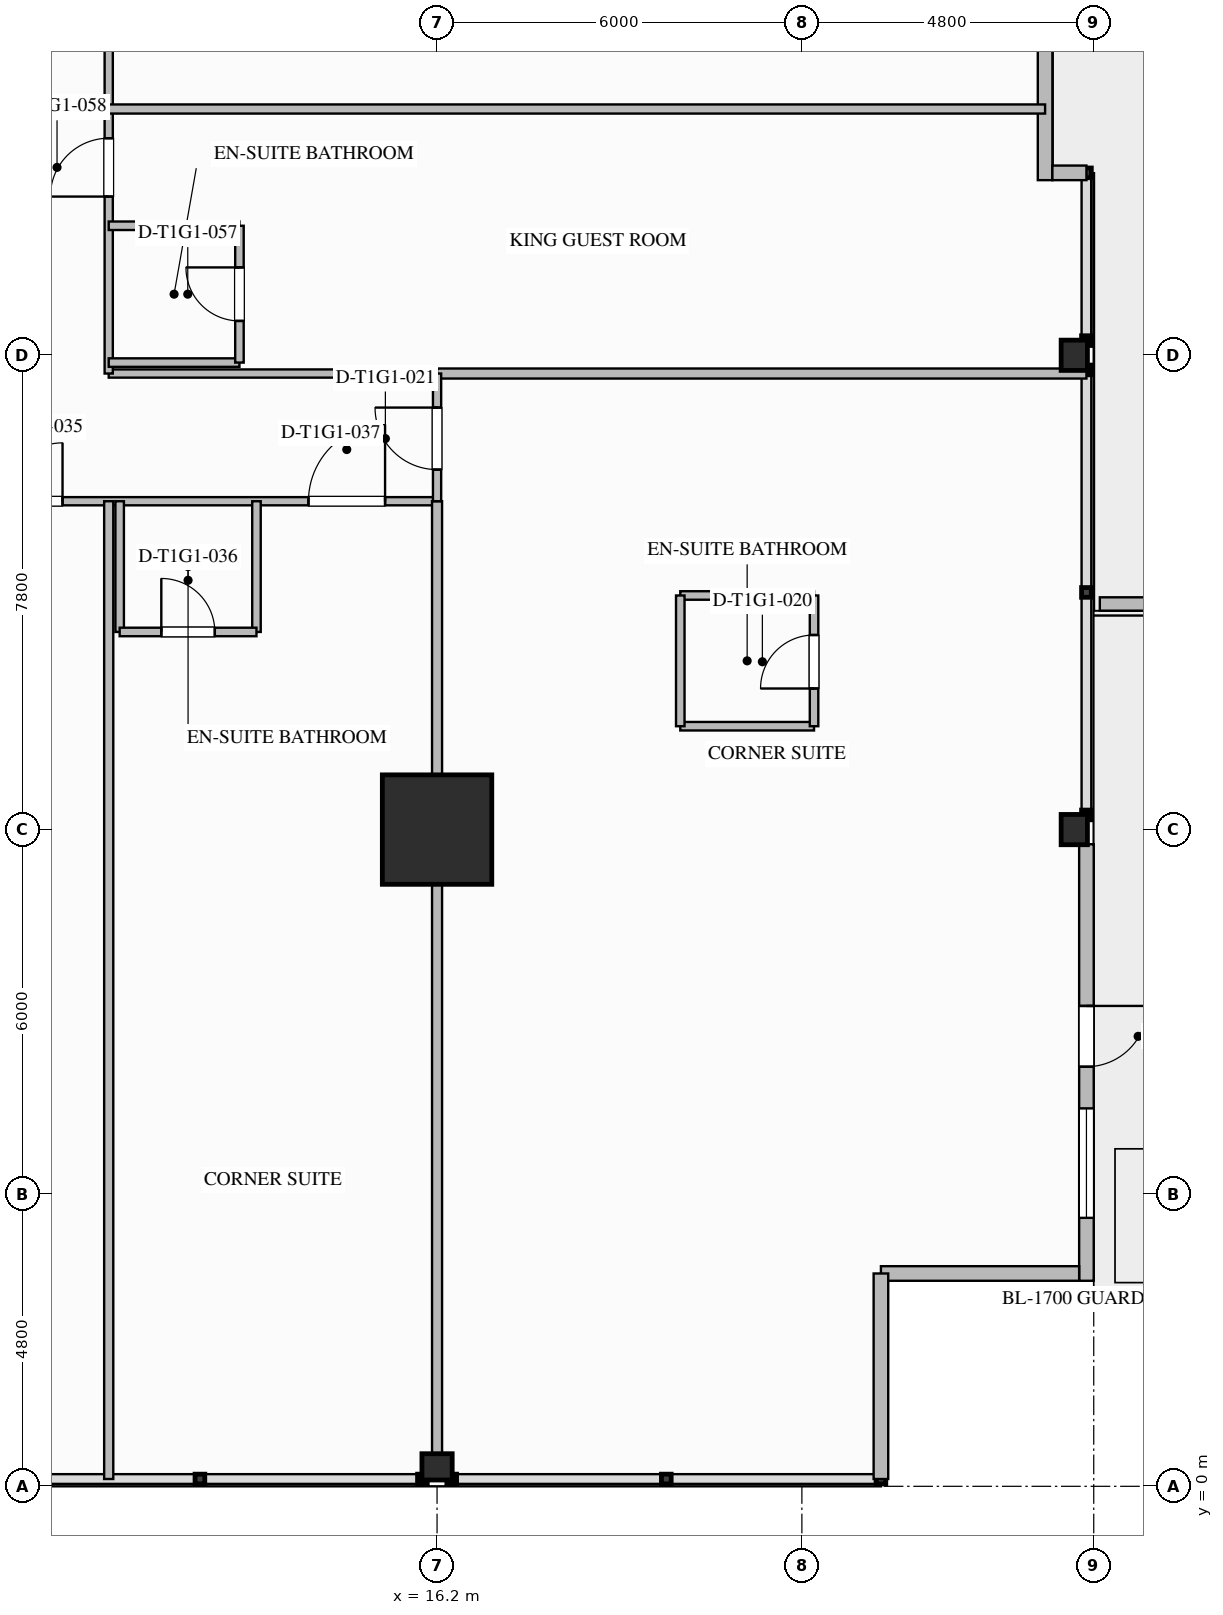
"""IFC4 building model, lengths in metres.
Left out: names, types, materials, properties, quantities, classifications, styles, units other than length and angle.
Written with IfcOpenShell. Run it as: python <this file> out.ifc"""

import sys

from ifc_helpers import new_model, si_unit, direction, frame, frame_2d, origin, origin_2d, place, context, subcontext, project, spatial, rectangle, i_section, extrude, element, fill, save


model = new_model("IFC4")
c1 = context("Model", 3, precision=1e-05, world=origin(), true_north=direction((0.0, 1.0)))
c2 = subcontext(c1, "Body", "Model", "MODEL_VIEW")
j1 = project(units=[si_unit("LENGTHUNIT", "METRE"), si_unit("PLANEANGLEUNIT", "RADIAN")], contexts=[c1])
p1 = place(None, origin())
s1 = spatial("IfcSite", under=j1, at=p1, CompositionType="ELEMENT")
p2 = place(p1, origin())
s2 = spatial("IfcBuilding", under=s1, at=p2, CompositionType="ELEMENT")
p3 = place(p2, frame((0.0, 0.0, 33.2)))
s3 = spatial("IfcBuildingStorey", under=s2, at=p3, CompositionType="ELEMENT", Elevation=33.2)
p4 = place(p3, frame((16.2, 10.8, 0.0), z_axis=(0.0, 0.0, 1.0), x_axis=(1.0, 0.0, 0.0)))
e1 = element("IfcColumn", 1, at=p4, inside=s3, PredefinedType="COLUMN", context=c2, shape_type="SweptSolid", body=[
    extrude(rectangle(XDim=1.8, YDim=1.8, at=origin_2d()), origin(), (0.0, 0.0, 1.0), 3.5),
])
for number, where, z_axis, x_axis in (
    (2, (26.68, 10.8, -0.26), (0.0, 0.0, 1.0), (1.0, 0.0, 0.0)),
    (3, (26.68, 18.6, -0.26), (0.0, 0.0, 1.0), (1.0, 0.0, 0.0)),
    (4, (16.2, 0.32, -0.26), (0.0, 0.0, 1.0), (0.0, 1.0, 0.0)),
):
    element("IfcColumn", number, at=place(p3, frame(where, z_axis=z_axis, x_axis=x_axis)), inside=s3, PredefinedType="COLUMN", context=c2, shape_type="SweptSolid", body=[
        extrude(i_section(OverallWidth=0.432, OverallDepth=0.498, WebThickness=0.056, FlangeThickness=0.089, FilletRadius=0.03, at=origin_2d()), origin(), (0.0, 0.0, 1.0), 3.757),
    ])
p5 = place(p3, frame((38.89, 14.51, 0.0), z_axis=(0.0, 0.0, 1.0), x_axis=(-1.0, 0.0, 0.0)))
e5 = element("IfcWall", 5, at=p5, inside=s3, PredefinedType="PARAPET", context=c2, shape_type="SweptSolid", body=[
    extrude(rectangle(XDim=11.79, YDim=0.22, at=frame_2d((5.895, 0.0))), origin(), (0.0, 0.0, 1.0), 1.2),
])
p6 = place(p3, frame((26.2, 26.759, 0.0), z_axis=(0.0, 0.0, 1.0), x_axis=(0.0, -1.0, 0.0)))
e6 = element("IfcWall", 6, at=p6, inside=s3, PredefinedType="STANDARD", context=c2, shape_type="SweptSolid", body=[
    extrude(rectangle(XDim=5.279, YDim=0.24, at=frame_2d((2.64, 0.0))), origin(), (0.0, 0.0, 1.0), 2.629),
])
p7 = place(p6, frame((1.859, 0.0, 0.0)))
e7 = element("IfcOpeningElement", 7, at=p7, cuts=e6, PredefinedType="OPENING", context=c2, shape_type="SweptSolid", body=[
    extrude(rectangle(XDim=1.0, YDim=2.2, at=frame_2d((0.5, 1.1))), frame((0.0, 0.13, 0.0), z_axis=(0.0, -1.0, 0.0), x_axis=(1.0, 0.0, 0.0)), (0.0, 0.0, 1.0), 0.26),
])
p8 = place(p3, frame((26.88, 10.559, 0.0), z_axis=(0.0, 0.0, 1.0), x_axis=(0.0, -1.0, 0.0)))
e8 = element("IfcWall", 8, at=p8, inside=s3, PredefinedType="STANDARD", context=c2, shape_type="SweptSolid", body=[
    extrude(rectangle(XDim=7.179, YDim=0.24, at=frame_2d((3.59, 0.0))), origin(), (0.0, 0.0, 1.0), 3.24),
])
p9 = place(p8, frame((2.659, 0.0, 0.0)))
e9 = element("IfcOpeningElement", 9, at=p9, cuts=e8, PredefinedType="OPENING", context=c2, shape_type="SweptSolid", body=[
    extrude(rectangle(XDim=1.0, YDim=2.2, at=frame_2d((0.5, 1.1))), frame((0.0, 0.13, 0.0), z_axis=(0.0, -1.0, 0.0), x_axis=(1.0, 0.0, 0.0)), (0.0, 0.0, 1.0), 0.26),
])
p10 = place(p8, frame((4.344, 0.0, 0.75)))
e10 = element("IfcOpeningElement", 10, at=p10, cuts=e8, PredefinedType="OPENING", context=c2, shape_type="SweptSolid", body=[
    extrude(rectangle(XDim=1.8, YDim=2.05, at=frame_2d((0.9, 1.025))), frame((0.0, 0.13, 0.0), z_axis=(0.0, -1.0, 0.0), x_axis=(1.0, 0.0, 0.0)), (0.0, 0.0, 1.0), 0.26),
])
p11 = place(p3, frame((26.76, 3.5, 0.0), z_axis=(0.0, 0.0, 1.0), x_axis=(-1.0, 0.0, 0.0)))
e11 = element("IfcWall", 11, at=p11, inside=s3, PredefinedType="STANDARD", context=c2, shape_type="SweptSolid", body=[
    extrude(rectangle(XDim=3.26, YDim=0.24, at=frame_2d((1.63, 0.0))), origin(), (0.0, 0.0, 1.0), 3.24),
])
p12 = place(p3, frame((23.5, 3.5, 0.0), z_axis=(0.0, 0.0, 1.0), x_axis=(0.0, -1.0, 0.0)))
e12 = element("IfcWall", 12, at=p12, inside=s3, PredefinedType="STANDARD", context=c2, shape_type="SweptSolid", body=[
    extrude(rectangle(XDim=3.38, YDim=0.24, at=frame_2d((1.69, 0.0))), origin(), (0.0, 0.0, 1.0), 3.24),
])
p13 = place(p3, frame((26.32, 21.6, 0.0), z_axis=(0.0, 0.0, 1.0), x_axis=(1.0, 0.0, 0.0)))
e13 = element("IfcWall", 13, at=p13, inside=s3, PredefinedType="STANDARD", context=c2, shape_type="SweptSolid", body=[
    extrude(rectangle(XDim=0.56, YDim=0.24, at=frame_2d((0.28, 0.0))), origin(), (0.0, 0.0, 1.0), 3.24),
])
p14 = place(p3, frame((-16.2, 16.2, 0.0), z_axis=(0.0, 0.0, 1.0), x_axis=(1.0, 0.0, 0.0)))
e14 = element("IfcWall", 14, at=p14, inside=s3, PredefinedType="PARTITIONING", context=c2, shape_type="SweptSolid", body=[
    extrude(rectangle(XDim=32.4, YDim=0.135, at=frame_2d((16.2, 0.0))), origin(), (0.0, 0.0, 1.0), 3.24),
])
p15 = place(p14, frame((3.285, 0.0, 0.0)))
e15 = element("IfcOpeningElement", 15, at=p15, cuts=e14, PredefinedType="OPENING", context=c2, shape_type="SweptSolid", body=[
    extrude(rectangle(XDim=1.26, YDim=2.2, at=frame_2d((0.63, 1.1))), frame((0.0, 0.077, 0.0), z_axis=(0.0, -1.0, 0.0), x_axis=(1.0, 0.0, 0.0)), (0.0, 0.0, 1.0), 0.155),
])
p16 = place(p14, frame((8.59, 0.0, 0.0)))
e16 = element("IfcOpeningElement", 16, at=p16, cuts=e14, PredefinedType="OPENING", context=c2, shape_type="SweptSolid", body=[
    extrude(rectangle(XDim=0.96, YDim=2.15, at=frame_2d((0.48, 1.075))), frame((0.0, 0.077, 0.0), z_axis=(0.0, -1.0, 0.0), x_axis=(1.0, 0.0, 0.0)), (0.0, 0.0, 1.0), 0.155),
])
p17 = place(p14, frame((13.84, 0.0, 0.0)))
e17 = element("IfcOpeningElement", 17, at=p17, cuts=e14, PredefinedType="OPENING", context=c2, shape_type="SweptSolid", body=[
    extrude(rectangle(XDim=1.26, YDim=2.2, at=frame_2d((0.63, 1.1))), frame((0.0, 0.077, 0.0), z_axis=(0.0, -1.0, 0.0), x_axis=(1.0, 0.0, 0.0)), (0.0, 0.0, 1.0), 0.155),
])
p18 = place(p14, frame((19.73, 0.0, 0.0)))
e18 = element("IfcOpeningElement", 18, at=p18, cuts=e14, PredefinedType="OPENING", context=c2, shape_type="SweptSolid", body=[
    extrude(rectangle(XDim=1.26, YDim=2.2, at=frame_2d((0.63, 1.1))), frame((0.0, 0.077, 0.0), z_axis=(0.0, -1.0, 0.0), x_axis=(1.0, 0.0, 0.0)), (0.0, 0.0, 1.0), 0.155),
])
p19 = place(p14, frame((25.281, 0.0, 0.0)))
e19 = element("IfcOpeningElement", 19, at=p19, cuts=e14, PredefinedType="OPENING", context=c2, shape_type="SweptSolid", body=[
    extrude(rectangle(XDim=0.96, YDim=2.15, at=frame_2d((0.48, 1.075))), frame((0.0, 0.077, 0.0), z_axis=(0.0, -1.0, 0.0), x_axis=(1.0, 0.0, 0.0)), (0.0, 0.0, 1.0), 0.155),
])
p20 = place(p14, frame((30.285, 0.0, 0.0)))
e20 = element("IfcOpeningElement", 20, at=p20, cuts=e14, PredefinedType="OPENING", context=c2, shape_type="SweptSolid", body=[
    extrude(rectangle(XDim=1.26, YDim=2.2, at=frame_2d((0.63, 1.1))), frame((0.0, 0.077, 0.0), z_axis=(0.0, -1.0, 0.0), x_axis=(1.0, 0.0, 0.0)), (0.0, 0.0, 1.0), 0.155),
])
p21 = place(p3, frame((10.8, 18.3, 0.0), z_axis=(0.0, 0.0, 1.0), x_axis=(1.0, 0.0, 0.0)))
e21 = element("IfcWall", 21, at=p21, inside=s3, PredefinedType="PARTITIONING", context=c2, shape_type="SweptSolid", body=[
    extrude(rectangle(XDim=5.4, YDim=0.135, at=frame_2d((2.7, 0.0))), origin(), (0.0, 0.0, 1.0), 3.24),
])
p22 = place(p3, frame((10.8, 18.3, 0.0), z_axis=(0.0, 0.0, 1.0), x_axis=(0.0, 1.0, 0.0)))
e22 = element("IfcWall", 22, at=p22, inside=s3, PredefinedType="PARTITIONING", context=c2, shape_type="SweptSolid", body=[
    extrude(rectangle(XDim=17.4, YDim=0.135, at=frame_2d((8.7, 0.0))), origin(), (0.0, 0.0, 1.0), 3.24),
])
p23 = place(p22, frame((2.91, 0.0, 0.0)))
e23 = element("IfcOpeningElement", 23, at=p23, cuts=e22, PredefinedType="OPENING", context=c2, shape_type="SweptSolid", body=[
    extrude(rectangle(XDim=0.96, YDim=2.15, at=frame_2d((0.48, 1.075))), frame((0.0, 0.077, 0.0), z_axis=(0.0, -1.0, 0.0), x_axis=(1.0, 0.0, 0.0)), (0.0, 0.0, 1.0), 0.155),
])
p24 = place(p22, frame((6.015, 0.0, 0.0)))
e24 = element("IfcOpeningElement", 24, at=p24, cuts=e22, PredefinedType="OPENING", context=c2, shape_type="SweptSolid", body=[
    extrude(rectangle(XDim=1.02, YDim=2.15, at=frame_2d((0.51, 1.075))), frame((0.0, 0.077, 0.0), z_axis=(0.0, -1.0, 0.0), x_axis=(1.0, 0.0, 0.0)), (0.0, 0.0, 1.0), 0.155),
])
p25 = place(p22, frame((11.61, 0.0, 0.0)))
e25 = element("IfcOpeningElement", 25, at=p25, cuts=e22, PredefinedType="OPENING", context=c2, shape_type="SweptSolid", body=[
    extrude(rectangle(XDim=0.96, YDim=2.15, at=frame_2d((0.48, 1.075))), frame((0.0, 0.077, 0.0), z_axis=(0.0, -1.0, 0.0), x_axis=(1.0, 0.0, 0.0)), (0.0, 0.0, 1.0), 0.155),
])
p26 = place(p22, frame((15.96, 0.0, 0.0)))
e26 = element("IfcOpeningElement", 26, at=p26, cuts=e22, PredefinedType="OPENING", context=c2, shape_type="SweptSolid", body=[
    extrude(rectangle(XDim=0.96, YDim=2.15, at=frame_2d((0.48, 1.075))), frame((0.0, 0.077, 0.0), z_axis=(0.0, -1.0, 0.0), x_axis=(1.0, 0.0, 0.0)), (0.0, 0.0, 1.0), 0.155),
])
p27 = place(p3, frame((16.2, 0.12, 0.0), z_axis=(0.0, 0.0, 1.0), x_axis=(0.0, 1.0, 0.0)))
e27 = element("IfcWall", 27, at=p27, inside=s3, PredefinedType="PARTITIONING", context=c2, shape_type="SweptSolid", body=[
    extrude(rectangle(XDim=16.08, YDim=0.165, at=frame_2d((8.04, 0.0))), origin(), (0.0, 0.0, 1.0), 2.298),
])
p28 = place(p3, frame((16.2, 18.3, 0.0), z_axis=(0.0, 0.0, 1.0), x_axis=(1.0, 0.0, 0.0)))
e28 = element("IfcWall", 28, at=p28, inside=s3, PredefinedType="PARTITIONING", context=c2, shape_type="SweptSolid", body=[
    extrude(rectangle(XDim=10.68, YDim=0.165, at=frame_2d((5.34, 0.0))), origin(), (0.0, 0.0, 1.0), 2.298),
])
p29 = place(p3, frame((16.2, 16.2, 0.0), z_axis=(0.0, 0.0, 1.0), x_axis=(0.0, 1.0, 0.0)))
e29 = element("IfcWall", 29, at=p29, inside=s3, PredefinedType="PARTITIONING", context=c2, shape_type="SweptSolid", body=[
    extrude(rectangle(XDim=2.1, YDim=0.135, at=frame_2d((1.05, 0.0))), origin(), (0.0, 0.0, 1.0), 2.298),
])
p30 = place(p29, frame((0.52, 0.0, 0.0)))
e30 = element("IfcOpeningElement", 30, at=p30, cuts=e29, PredefinedType="OPENING", context=c2, shape_type="SweptSolid", body=[
    extrude(rectangle(XDim=1.02, YDim=2.15, at=frame_2d((0.51, 1.075))), frame((0.0, 0.077, 0.0), z_axis=(0.0, -1.0, 0.0), x_axis=(1.0, 0.0, 0.0)), (0.0, 0.0, 1.0), 0.155),
])
for number, where, z_axis, x_axis in (
    (31, (20.2, 12.5, 0.0), (0.0, 0.0, 1.0), (1.0, 0.0, 0.0)),
    (32, (20.2, 14.65, 0.0), (0.0, 0.0, 1.0), (1.0, 0.0, 0.0)),
):
    element("IfcWall", number, at=place(p3, frame(where, z_axis=z_axis, x_axis=x_axis)), inside=s3, PredefinedType="PLUMBINGWALL", context=c2, shape_type="SweptSolid", body=[
        extrude(rectangle(XDim=2.2, YDim=0.14, at=frame_2d((1.1, 0.0))), origin(), (0.0, 0.0, 1.0), 3.24),
    ])
p31 = place(p3, frame((20.2, 12.5, 0.0), z_axis=(0.0, 0.0, 1.0), x_axis=(0.0, 1.0, 0.0)))
e33 = element("IfcWall", 33, at=p31, inside=s3, PredefinedType="PLUMBINGWALL", context=c2, shape_type="SweptSolid", body=[
    extrude(rectangle(XDim=2.15, YDim=0.14, at=frame_2d((1.075, 0.0))), origin(), (0.0, 0.0, 1.0), 3.24),
])
p32 = place(p3, frame((22.4, 12.5, 0.0), z_axis=(0.0, 0.0, 1.0), x_axis=(0.0, 1.0, 0.0)))
e34 = element("IfcWall", 34, at=p32, inside=s3, PredefinedType="PLUMBINGWALL", context=c2, shape_type="SweptSolid", body=[
    extrude(rectangle(XDim=2.15, YDim=0.14, at=frame_2d((1.075, 0.0))), origin(), (0.0, 0.0, 1.0), 3.24),
])
p33 = place(p32, frame((0.62, 0.0, 0.0)))
e35 = element("IfcOpeningElement", 35, at=p33, cuts=e34, PredefinedType="OPENING", context=c2, shape_type="SweptSolid", body=[
    extrude(rectangle(XDim=0.88, YDim=2.1, at=frame_2d((0.44, 1.05))), frame((0.0, 0.08, 0.0), z_axis=(0.0, -1.0, 0.0), x_axis=(1.0, 0.0, 0.0)), (0.0, 0.0, 1.0), 0.16),
])
p34 = place(p3, frame((10.8, 0.12, 0.0), z_axis=(0.0, 0.0, 1.0), x_axis=(0.0, 1.0, 0.0)))
e36 = element("IfcWall", 36, at=p34, inside=s3, PredefinedType="PARTITIONING", context=c2, shape_type="SweptSolid", body=[
    extrude(rectangle(XDim=16.08, YDim=0.15, at=frame_2d((8.04, 0.0))), origin(), (0.0, 0.0, 1.0), 3.24),
])
for number, where, z_axis, x_axis in (
    (37, (10.98, 16.2, 0.0), (0.0, 0.0, 1.0), (0.0, -1.0, 0.0)),
    (38, (13.23, 16.2, 0.0), (0.0, 0.0, 1.0), (0.0, -1.0, 0.0)),
):
    element("IfcWall", number, at=place(p3, frame(where, z_axis=z_axis, x_axis=x_axis)), inside=s3, PredefinedType="PLUMBINGWALL", context=c2, shape_type="SweptSolid", body=[
        extrude(rectangle(XDim=2.15, YDim=0.14, at=frame_2d((1.075, 0.0))), origin(), (0.0, 0.0, 1.0), 3.24),
    ])
p35 = place(p3, frame((10.98, 14.05, 0.0), z_axis=(0.0, 0.0, 1.0), x_axis=(1.0, 0.0, 0.0)))
e39 = element("IfcWall", 39, at=p35, inside=s3, PredefinedType="PLUMBINGWALL", context=c2, shape_type="SweptSolid", body=[
    extrude(rectangle(XDim=2.25, YDim=0.14, at=frame_2d((1.125, 0.0))), origin(), (0.0, 0.0, 1.0), 3.24),
])
p36 = place(p35, frame((0.685, 0.0, 0.0)))
e40 = element("IfcOpeningElement", 40, at=p36, cuts=e39, PredefinedType="OPENING", context=c2, shape_type="SweptSolid", body=[
    extrude(rectangle(XDim=0.88, YDim=2.1, at=frame_2d((0.44, 1.05))), frame((0.0, 0.08, 0.0), z_axis=(0.0, -1.0, 0.0), x_axis=(1.0, 0.0, 0.0)), (0.0, 0.0, 1.0), 0.16),
])
p37 = place(p3, frame((10.8, 18.48, 0.0), z_axis=(0.0, 0.0, 1.0), x_axis=(1.0, 0.0, 0.0)))
e41 = element("IfcWall", 41, at=p37, inside=s3, PredefinedType="PLUMBINGWALL", context=c2, shape_type="SweptSolid", body=[
    extrude(rectangle(XDim=2.15, YDim=0.14, at=frame_2d((1.075, 0.0))), origin(), (0.0, 0.0, 1.0), 2.617),
])
p38 = place(p3, frame((10.8, 20.73, 0.0), z_axis=(0.0, 0.0, 1.0), x_axis=(1.0, 0.0, 0.0)))
e42 = element("IfcWall", 42, at=p38, inside=s3, PredefinedType="PLUMBINGWALL", context=c2, shape_type="SweptSolid", body=[
    extrude(rectangle(XDim=2.15, YDim=0.14, at=frame_2d((1.075, 0.0))), origin(), (0.0, 0.0, 1.0), 3.24),
])
p39 = place(p3, frame((12.95, 18.48, 0.0), z_axis=(0.0, 0.0, 1.0), x_axis=(0.0, 1.0, 0.0)))
e43 = element("IfcWall", 43, at=p39, inside=s3, PredefinedType="PLUMBINGWALL", context=c2, shape_type="SweptSolid", body=[
    extrude(rectangle(XDim=2.25, YDim=0.14, at=frame_2d((1.125, 0.0))), origin(), (0.0, 0.0, 1.0), 3.24),
])
p40 = place(p39, frame((0.685, 0.0, 0.0)))
e44 = element("IfcOpeningElement", 44, at=p40, cuts=e43, PredefinedType="OPENING", context=c2, shape_type="SweptSolid", body=[
    extrude(rectangle(XDim=0.88, YDim=2.1, at=frame_2d((0.44, 1.05))), frame((0.0, 0.08, 0.0), z_axis=(0.0, -1.0, 0.0), x_axis=(1.0, 0.0, 0.0)), (0.0, 0.0, 1.0), 0.16),
])
p41 = place(p3, frame((10.8, 22.65, 0.0), z_axis=(0.0, 0.0, 1.0), x_axis=(1.0, 0.0, 0.0)))
e45 = element("IfcWall", 45, at=p41, inside=s3, PredefinedType="PARTITIONING", context=c2, shape_type="SweptSolid", body=[
    extrude(rectangle(XDim=15.4, YDim=0.15, at=frame_2d((7.7, 0.0))), origin(), (0.0, 0.0, 1.0), 3.24),
])
p42 = place(p9, origin())
e46 = element("IfcDoor", 46, at=p42, inside=s3, OperationType="SINGLE_SWING_LEFT", PredefinedType="DOOR", context=c2, shape_type="SweptSolid", body=[
    extrude(rectangle(XDim=1.0, YDim=2.2, at=frame_2d((0.5, 1.1))), frame((0.0, 0.025, 0.0), z_axis=(0.0, -1.0, 0.0), x_axis=(1.0, 0.0, 0.0)), (0.0, 0.0, 1.0), 0.05),
])
fill(e9, e46)
p43 = place(p10, origin())
e47 = element("IfcWindow", 47, at=p43, inside=s3, PartitioningType="SINGLE_PANEL", PredefinedType="WINDOW", context=c2, shape_type="SweptSolid", body=[
    extrude(rectangle(XDim=1.8, YDim=2.05, at=frame_2d((0.9, 1.025))), frame((0.0, 0.03, 0.0), z_axis=(0.0, -1.0, 0.0), x_axis=(1.0, 0.0, 0.0)), (0.0, 0.0, 1.0), 0.06),
])
fill(e10, e47)
p44 = place(p33, origin())
e48 = element("IfcDoor", 48, at=p44, inside=s3, OperationType="SINGLE_SWING_LEFT", PredefinedType="DOOR", context=c2, shape_type="SweptSolid", body=[
    extrude(rectangle(XDim=0.88, YDim=2.1, at=frame_2d((0.44, 1.05))), frame((0.0, 0.025, 0.0), z_axis=(0.0, -1.0, 0.0), x_axis=(1.0, 0.0, 0.0)), (0.0, 0.0, 1.0), 0.05),
])
fill(e35, e48)
p45 = place(p30, origin())
e49 = element("IfcDoor", 49, at=p45, inside=s3, OperationType="SINGLE_SWING_RIGHT", PredefinedType="DOOR", context=c2, shape_type="SweptSolid", body=[
    extrude(rectangle(XDim=1.02, YDim=2.15, at=frame_2d((0.51, 1.075))), frame((0.0, 0.025, 0.0), z_axis=(0.0, -1.0, 0.0), x_axis=(1.0, 0.0, 0.0)), (0.0, 0.0, 1.0), 0.05),
])
fill(e30, e49)
p46 = place(p19, origin())
e50 = element("IfcDoor", 50, at=p46, inside=s3, OperationType="SINGLE_SWING_RIGHT", PredefinedType="DOOR", context=c2, shape_type="SweptSolid", body=[
    extrude(rectangle(XDim=0.96, YDim=2.15, at=frame_2d((0.48, 1.075))), frame((0.0, 0.025, 0.0), z_axis=(0.0, -1.0, 0.0), x_axis=(1.0, 0.0, 0.0)), (0.0, 0.0, 1.0), 0.05),
])
fill(e19, e50)
p47 = place(p36, origin())
e51 = element("IfcDoor", 51, at=p47, inside=s3, OperationType="SINGLE_SWING_LEFT", PredefinedType="DOOR", context=c2, shape_type="SweptSolid", body=[
    extrude(rectangle(XDim=0.88, YDim=2.1, at=frame_2d((0.44, 1.05))), frame((0.0, 0.025, 0.0), z_axis=(0.0, -1.0, 0.0), x_axis=(1.0, 0.0, 0.0)), (0.0, 0.0, 1.0), 0.05),
])
fill(e40, e51)
p48 = place(p20, origin())
e52 = element("IfcDoor", 52, at=p48, inside=s3, OperationType="SINGLE_SWING_RIGHT", PredefinedType="DOOR", context=c2, shape_type="SweptSolid", body=[
    extrude(rectangle(XDim=1.26, YDim=2.2, at=frame_2d((0.63, 1.1))), frame((0.0, 0.025, 0.0), z_axis=(0.0, -1.0, 0.0), x_axis=(1.0, 0.0, 0.0)), (0.0, 0.0, 1.0), 0.05),
])
fill(e20, e52)
p49 = place(p40, origin())
e53 = element("IfcDoor", 53, at=p49, inside=s3, OperationType="SINGLE_SWING_RIGHT", PredefinedType="DOOR", context=c2, shape_type="SweptSolid", body=[
    extrude(rectangle(XDim=0.88, YDim=2.1, at=frame_2d((0.44, 1.05))), frame((0.0, 0.025, 0.0), z_axis=(0.0, -1.0, 0.0), x_axis=(1.0, 0.0, 0.0)), (0.0, 0.0, 1.0), 0.05),
])
fill(e44, e53)
p50 = place(p23, origin())
e54 = element("IfcDoor", 54, at=p50, inside=s3, OperationType="SINGLE_SWING_LEFT", PredefinedType="DOOR", context=c2, shape_type="SweptSolid", body=[
    extrude(rectangle(XDim=0.96, YDim=2.15, at=frame_2d((0.48, 1.075))), frame((0.0, 0.025, 0.0), z_axis=(0.0, -1.0, 0.0), x_axis=(1.0, 0.0, 0.0)), (0.0, 0.0, 1.0), 0.05),
])
fill(e23, e54)
save(model, sys.argv[1])
